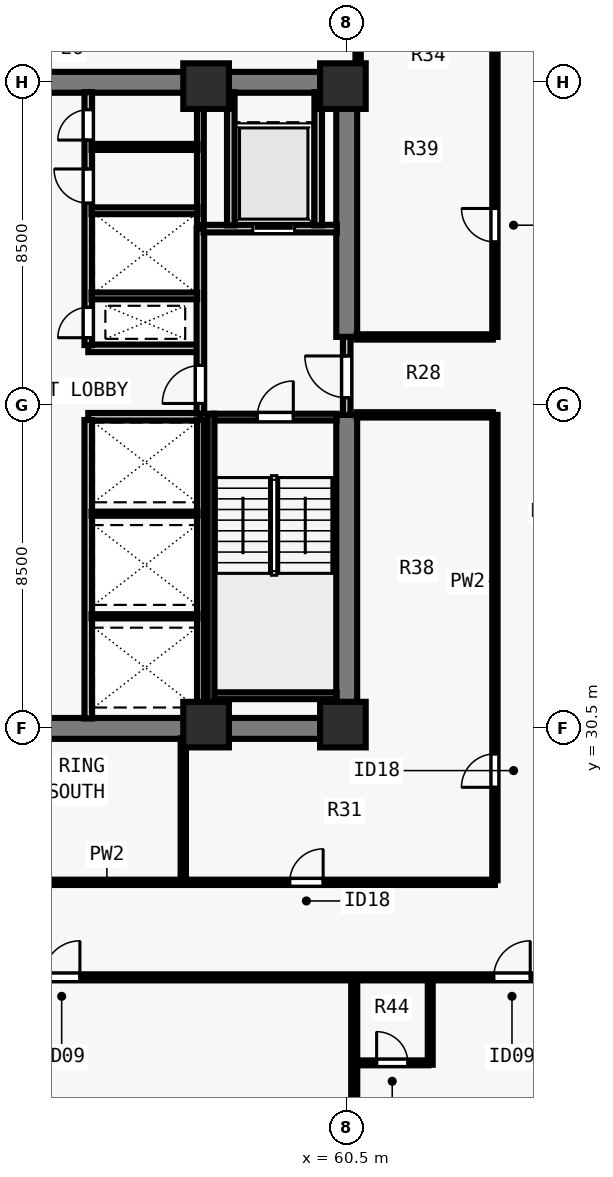
"""IFC4 building model, lengths in metres.
Left out: names, types, materials, properties, quantities, classifications, styles, units other than length and angle.
Written with IfcOpenShell. Run it as: python <this file> out.ifc"""

import sys

from ifc_helpers import new_model, si_unit, direction, frame, frame_2d, origin, origin_2d, place, context, subcontext, project, spatial, rectangle, extrude, element, fill, save


model = new_model("IFC4")
c1 = context("Model", 3, precision=1e-05, world=origin(), true_north=direction((0.0, 1.0)))
c2 = subcontext(c1, "Body", "Model", "MODEL_VIEW")
j1 = project(units=[si_unit("LENGTHUNIT", "METRE"), si_unit("PLANEANGLEUNIT", "RADIAN")], contexts=[c1])
p1 = place(None, origin())
s1 = spatial("IfcSite", under=j1, at=p1, CompositionType="ELEMENT")
p2 = place(p1, origin())
s2 = spatial("IfcBuilding", under=s1, at=p2, CompositionType="ELEMENT")
p3 = place(p2, frame((0.0, 0.0, 86.5)))
s3 = spatial("IfcBuildingStorey", under=s2, at=p3, CompositionType="ELEMENT", Elevation=86.5)
for number, where, z_axis, x_axis in (
    (1, (56.8, 30.6, 0.0), (0.0, 0.0, 1.0), (1.0, 0.0, 0.0)),
    (2, (60.4, 30.6, 0.0), (0.0, 0.0, 1.0), (1.0, 0.0, 0.0)),
    (3, (56.8, 47.4, 0.0), (0.0, 0.0, 1.0), (1.0, 0.0, 0.0)),
    (4, (60.4, 47.4, 0.0), (0.0, 0.0, 1.0), (1.0, 0.0, 0.0)),
):
    element("IfcColumn", number, at=place(p3, frame(where, z_axis=z_axis, x_axis=x_axis)), inside=s3, PredefinedType="COLUMN", context=c2, shape_type="SweptSolid", body=[
        extrude(rectangle(XDim=1.2, YDim=1.2, at=origin_2d()), origin(), (0.0, 0.0, 1.0), 3.5),
    ])
for number, where, z_axis, x_axis in (
    (5, (43.225, 30.5, 0.0), (0.0, 0.0, 1.0), (1.0, 0.0, 0.0)),
    (6, (43.225, 47.5, 0.0), (0.0, 0.0, 1.0), (1.0, 0.0, 0.0)),
):
    element("IfcWall", number, at=place(p3, frame(where, z_axis=z_axis, x_axis=x_axis)), inside=s3, PredefinedType="SHEAR", context=c2, shape_type="SweptSolid", body=[
        extrude(rectangle(XDim=17.55, YDim=0.55, at=frame_2d((8.775, 0.0))), origin(), (0.0, 0.0, 1.0), 3.28),
    ])
p4 = place(p3, frame((60.5, 30.765, 0.0), z_axis=(0.0, 0.0, 1.0), x_axis=(0.0, 1.0, 0.0)))
e7 = element("IfcWall", 7, at=p4, inside=s3, PredefinedType="SHEAR", context=c2, shape_type="SweptSolid", body=[
    extrude(rectangle(XDim=7.985, YDim=0.55, at=frame_2d((3.993, 0.0))), origin(), (0.0, 0.0, 1.0), 3.28),
])
p5 = place(p3, frame((60.5, 40.8, 0.0), z_axis=(0.0, 0.0, 1.0), x_axis=(0.0, 1.0, 0.0)))
e8 = element("IfcWall", 8, at=p5, inside=s3, PredefinedType="SHEAR", context=c2, shape_type="SweptSolid", body=[
    extrude(rectangle(XDim=6.435, YDim=0.55, at=frame_2d((3.218, 0.0))), origin(), (0.0, 0.0, 1.0), 3.28),
])
for number, where, z_axis, x_axis in (
    (9, (53.7, 38.7, 0.0), (0.0, 0.0, 1.0), (1.0, 0.0, 0.0)),
    (10, (53.7, 40.5, 0.0), (0.0, 0.0, 1.0), (1.0, 0.0, 0.0)),
):
    element("IfcWall", number, at=place(p3, frame(where, z_axis=z_axis, x_axis=x_axis)), inside=s3, PredefinedType="SOLIDWALL", context=c2, shape_type="SweptSolid", body=[
        extrude(rectangle(XDim=2.95, YDim=0.2, at=frame_2d((1.475, 0.0))), origin(), (0.0, 0.0, 1.0), 3.28),
    ])
p6 = place(p3, frame((53.7, 30.76, 0.0), z_axis=(0.0, 0.0, 1.0), x_axis=(0.0, 1.0, 0.0)))
e11 = element("IfcWall", 11, at=p6, inside=s3, PredefinedType="SOLIDWALL", context=c2, shape_type="SweptSolid", body=[
    extrude(rectangle(XDim=7.855, YDim=0.2, at=frame_2d((3.927, 0.0))), origin(), (0.0, 0.0, 1.0), 3.28),
])
p7 = place(p3, frame((53.7, 40.585, 0.0), z_axis=(0.0, 0.0, 1.0), x_axis=(0.0, 1.0, 0.0)))
e12 = element("IfcWall", 12, at=p7, inside=s3, PredefinedType="SOLIDWALL", context=c2, shape_type="SweptSolid", body=[
    extrude(rectangle(XDim=6.655, YDim=0.2, at=frame_2d((3.328, 0.0))), origin(), (0.0, 0.0, 1.0), 3.28),
])
p8 = place(p7, frame((0.195, 0.0, 0.0)))
e13 = element("IfcOpeningElement", 13, at=p8, cuts=e12, PredefinedType="OPENING", context=c2, shape_type="SweptSolid", body=[
    extrude(rectangle(XDim=0.8, YDim=2.08, at=frame_2d((0.4, 1.04))), frame((0.0, 0.11, 0.0), z_axis=(0.0, -1.0, 0.0), x_axis=(1.0, 0.0, 0.0)), (0.0, 0.0, 1.0), 0.22),
])
p9 = place(p7, frame((3.735, 0.0, 0.0)))
e14 = element("IfcOpeningElement", 14, at=p9, cuts=e12, PredefinedType="OPENING", context=c2, shape_type="SweptSolid", body=[
    extrude(rectangle(XDim=0.9, YDim=2.12, at=frame_2d((0.45, 1.06))), frame((0.0, 0.11, 0.0), z_axis=(0.0, -1.0, 0.0), x_axis=(1.0, 0.0, 0.0)), (0.0, 0.0, 1.0), 0.22),
])
p10 = place(p7, frame((5.395, 0.0, 0.0)))
e15 = element("IfcOpeningElement", 15, at=p10, cuts=e12, PredefinedType="OPENING", context=c2, shape_type="SweptSolid", body=[
    extrude(rectangle(XDim=0.8, YDim=2.1, at=frame_2d((0.4, 1.05))), frame((0.0, 0.11, 0.0), z_axis=(0.0, -1.0, 0.0), x_axis=(1.0, 0.0, 0.0)), (0.0, 0.0, 1.0), 0.22),
])
p11 = place(p3, frame((60.5, 38.75, 0.0), z_axis=(0.0, 0.0, 1.0), x_axis=(0.0, 1.0, 0.0)))
e16 = element("IfcWall", 16, at=p11, inside=s3, PredefinedType="SOLIDWALL", context=c2, shape_type="SweptSolid", body=[
    extrude(rectangle(XDim=2.05, YDim=0.2, at=frame_2d((1.025, 0.0))), origin(), (0.0, 0.0, 1.0), 3.28),
])
p12 = place(p11, frame((0.45, 0.0, 0.0)))
e17 = element("IfcOpeningElement", 17, at=p12, cuts=e16, PredefinedType="OPENING", context=c2, shape_type="SweptSolid", body=[
    extrude(rectangle(XDim=1.1, YDim=2.15, at=frame_2d((0.55, 1.075))), frame((0.0, 0.11, 0.0), z_axis=(0.0, -1.0, 0.0), x_axis=(1.0, 0.0, 0.0)), (0.0, 0.0, 1.0), 0.22),
])
p13 = place(p3, frame((56.65, 38.785, 0.0), z_axis=(0.0, 0.0, 1.0), x_axis=(0.0, 1.0, 0.0)))
e18 = element("IfcWall", 18, at=p13, inside=s3, PredefinedType="SOLIDWALL", context=c2, shape_type="SweptSolid", body=[
    extrude(rectangle(XDim=4.865, YDim=0.2, at=frame_2d((2.433, 0.0))), origin(), (0.0, 0.0, 1.0), 3.28),
])
p14 = place(p13, frame((0.265, 0.0, 0.0)))
e19 = element("IfcOpeningElement", 19, at=p14, cuts=e18, PredefinedType="OPENING", context=c2, shape_type="SweptSolid", body=[
    extrude(rectangle(XDim=1.0, YDim=2.15, at=frame_2d((0.5, 1.075))), frame((0.0, 0.11, 0.0), z_axis=(0.0, -1.0, 0.0), x_axis=(1.0, 0.0, 0.0)), (0.0, 0.0, 1.0), 0.22),
])
p15 = place(p3, frame((56.735, 43.65, 0.0), z_axis=(0.0, 0.0, 1.0), x_axis=(1.0, 0.0, 0.0)))
e20 = element("IfcWall", 20, at=p15, inside=s3, PredefinedType="SOLIDWALL", context=c2, shape_type="SweptSolid", body=[
    extrude(rectangle(XDim=3.505, YDim=0.2, at=frame_2d((1.752, 0.0))), origin(), (0.0, 0.0, 1.0), 3.28),
])
p16 = place(p15, frame((1.295, 0.0, 0.0)))
e21 = element("IfcOpeningElement", 21, at=p16, cuts=e20, PredefinedType="OPENING", context=c2, shape_type="SweptSolid", body=[
    extrude(rectangle(XDim=1.1, YDim=2.2, at=frame_2d((0.55, 1.1))), frame((0.0, 0.11, 0.0), z_axis=(0.0, -1.0, 0.0), x_axis=(1.0, 0.0, 0.0)), (0.0, 0.0, 1.0), 0.22),
])
for number, where, z_axis, x_axis in (
    (22, (57.45, 43.735, 0.0), (0.0, 0.0, 1.0), (0.0, 1.0, 0.0)),
    (23, (59.75, 43.735, 0.0), (0.0, 0.0, 1.0), (0.0, 1.0, 0.0)),
):
    element("IfcWall", number, at=place(p3, frame(where, z_axis=z_axis, x_axis=x_axis)), inside=s3, PredefinedType="SOLIDWALL", context=c2, shape_type="SweptSolid", body=[
        extrude(rectangle(XDim=3.505, YDim=0.2, at=frame_2d((1.752, 0.0))), origin(), (0.0, 0.0, 1.0), 3.28),
    ])
p17 = place(p3, frame((56.65, 30.76, 0.0), z_axis=(0.0, 0.0, 1.0), x_axis=(0.0, 1.0, 0.0)))
e24 = element("IfcWall", 24, at=p17, inside=s3, PredefinedType="SOLIDWALL", context=c2, shape_type="SweptSolid", body=[
    extrude(rectangle(XDim=7.855, YDim=0.18, at=frame_2d((3.927, 0.0))), origin(), (0.0, 0.0, 1.0), 3.28),
])
for number, where, z_axis, x_axis in (
    (25, (53.785, 33.45, 0.0), (0.0, 0.0, 1.0), (1.0, 0.0, 0.0)),
    (26, (53.785, 36.15, 0.0), (0.0, 0.0, 1.0), (1.0, 0.0, 0.0)),
):
    element("IfcWall", number, at=place(p3, frame(where, z_axis=z_axis, x_axis=x_axis)), inside=s3, PredefinedType="PARTITIONING", context=c2, shape_type="SweptSolid", body=[
        extrude(rectangle(XDim=2.79, YDim=0.11, at=frame_2d((1.395, 0.0))), origin(), (0.0, 0.0, 1.0), 3.28),
    ])
p18 = place(p3, frame((56.65, 43.735, 0.0), z_axis=(0.0, 0.0, 1.0), x_axis=(0.0, 1.0, 0.0)))
e27 = element("IfcWall", 27, at=p18, inside=s3, PredefinedType="SOLIDWALL", context=c2, shape_type="SweptSolid", body=[
    extrude(rectangle(XDim=3.505, YDim=0.18, at=frame_2d((1.752, 0.0))), origin(), (0.0, 0.0, 1.0), 3.28),
])
p19 = place(p3, frame((53.785, 41.88, 0.0), z_axis=(0.0, 0.0, 1.0), x_axis=(1.0, 0.0, 0.0)))
e28 = element("IfcWall", 28, at=p19, inside=s3, PredefinedType="SOLIDWALL", context=c2, shape_type="SweptSolid", body=[
    extrude(rectangle(XDim=2.78, YDim=0.18, at=frame_2d((1.39, 0.0))), origin(), (0.0, 0.0, 1.0), 3.28),
])
p20 = place(p3, frame((53.785, 44.12, 0.0), z_axis=(0.0, 0.0, 1.0), x_axis=(1.0, 0.0, 0.0)))
e29 = element("IfcWall", 29, at=p20, inside=s3, PredefinedType="SOLIDWALL", context=c2, shape_type="SweptSolid", body=[
    extrude(rectangle(XDim=2.79, YDim=0.18, at=frame_2d((1.395, 0.0))), origin(), (0.0, 0.0, 1.0), 3.28),
])
p21 = place(p3, frame((53.785, 45.8, 0.0), z_axis=(0.0, 0.0, 1.0), x_axis=(1.0, 0.0, 0.0)))
e30 = element("IfcWall", 30, at=p21, inside=s3, PredefinedType="PARTITIONING", context=c2, shape_type="SweptSolid", body=[
    extrude(rectangle(XDim=2.79, YDim=0.16, at=frame_2d((1.395, 0.0))), origin(), (0.0, 0.0, 1.0), 3.28),
])
p22 = place(p3, frame((37.1, 23.95, 0.0), z_axis=(0.0, 0.0, 1.0), x_axis=(1.0, 0.0, 0.0)))
e31 = element("IfcWall", 31, at=p22, inside=s3, PredefinedType="PARTITIONING", context=c2, shape_type="SweptSolid", body=[
    extrude(rectangle(XDim=29.8, YDim=0.16, at=frame_2d((14.9, 0.0))), origin(), (0.0, 0.0, 1.0), 3.28),
])
p23 = place(p22, frame((2.571, 0.0, 0.0)))
e32 = element("IfcOpeningElement", 32, at=p23, cuts=e31, PredefinedType="OPENING", context=c2, shape_type="SweptSolid", body=[
    extrude(rectangle(XDim=0.96, YDim=2.15, at=frame_2d((0.48, 1.075))), frame((0.0, 0.09, 0.0), z_axis=(0.0, -1.0, 0.0), x_axis=(1.0, 0.0, 0.0)), (0.0, 0.0, 1.0), 0.18),
])
p24 = place(p22, frame((15.42, 0.0, 0.0)))
e33 = element("IfcOpeningElement", 33, at=p24, cuts=e31, PredefinedType="OPENING", context=c2, shape_type="SweptSolid", body=[
    extrude(rectangle(XDim=0.96, YDim=2.15, at=frame_2d((0.48, 1.075))), frame((0.0, 0.09, 0.0), z_axis=(0.0, -1.0, 0.0), x_axis=(1.0, 0.0, 0.0)), (0.0, 0.0, 1.0), 0.18),
])
p25 = place(p22, frame((27.269, 0.0, 0.0)))
e34 = element("IfcOpeningElement", 34, at=p25, cuts=e31, PredefinedType="OPENING", context=c2, shape_type="SweptSolid", body=[
    extrude(rectangle(XDim=0.96, YDim=2.15, at=frame_2d((0.48, 1.075))), frame((0.0, 0.09, 0.0), z_axis=(0.0, -1.0, 0.0), x_axis=(1.0, 0.0, 0.0)), (0.0, 0.0, 1.0), 0.18),
])
p26 = place(p3, frame((39.6, 26.45, 0.0), z_axis=(0.0, 0.0, 1.0), x_axis=(1.0, 0.0, 0.0)))
e35 = element("IfcWall", 35, at=p26, inside=s3, PredefinedType="PARTITIONING", context=c2, shape_type="SweptSolid", body=[
    extrude(rectangle(XDim=24.8, YDim=0.14, at=frame_2d((12.4, 0.0))), origin(), (0.0, 0.0, 1.0), 3.28),
])
p27 = place(p26, frame((1.2, 0.0, 0.0)))
e36 = element("IfcOpeningElement", 36, at=p27, cuts=e35, PredefinedType="OPENING", context=c2, shape_type="SweptSolid", body=[
    extrude(rectangle(XDim=0.88, YDim=2.1, at=frame_2d((0.44, 1.05))), frame((0.0, 0.08, 0.0), z_axis=(0.0, -1.0, 0.0), x_axis=(1.0, 0.0, 0.0)), (0.0, 0.0, 1.0), 0.16),
])
p28 = place(p26, frame((8.9, 0.0, 0.0)))
e37 = element("IfcOpeningElement", 37, at=p28, cuts=e35, PredefinedType="OPENING", context=c2, shape_type="SweptSolid", body=[
    extrude(rectangle(XDim=0.88, YDim=2.1, at=frame_2d((0.44, 1.05))), frame((0.0, 0.08, 0.0), z_axis=(0.0, -1.0, 0.0), x_axis=(1.0, 0.0, 0.0)), (0.0, 0.0, 1.0), 0.16),
])
p29 = place(p26, frame((19.4, 0.0, 0.0)))
e38 = element("IfcOpeningElement", 38, at=p29, cuts=e35, PredefinedType="OPENING", context=c2, shape_type="SweptSolid", body=[
    extrude(rectangle(XDim=0.88, YDim=2.1, at=frame_2d((0.44, 1.05))), frame((0.0, 0.08, 0.0), z_axis=(0.0, -1.0, 0.0), x_axis=(1.0, 0.0, 0.0)), (0.0, 0.0, 1.0), 0.16),
])
p30 = place(p3, frame((64.4, 26.505, 0.0), z_axis=(0.0, 0.0, 1.0), x_axis=(0.0, 1.0, 0.0)))
e39 = element("IfcWall", 39, at=p30, inside=s3, PredefinedType="PARTITIONING", context=c2, shape_type="SweptSolid", body=[
    extrude(rectangle(XDim=12.245, YDim=0.14, at=frame_2d((6.123, 0.0))), origin(), (0.0, 0.0, 1.0), 3.28),
])
p31 = place(p30, frame((2.445, 0.0, 0.0)))
e40 = element("IfcOpeningElement", 40, at=p31, cuts=e39, PredefinedType="OPENING", context=c2, shape_type="SweptSolid", body=[
    extrude(rectangle(XDim=0.88, YDim=2.1, at=frame_2d((0.44, 1.05))), frame((0.0, 0.08, 0.0), z_axis=(0.0, -1.0, 0.0), x_axis=(1.0, 0.0, 0.0)), (0.0, 0.0, 1.0), 0.16),
])
p32 = place(p3, frame((64.4, 40.8, 0.0), z_axis=(0.0, 0.0, 1.0), x_axis=(0.0, 1.0, 0.0)))
e41 = element("IfcWall", 41, at=p32, inside=s3, PredefinedType="PARTITIONING", context=c2, shape_type="SweptSolid", body=[
    extrude(rectangle(XDim=10.695, YDim=0.14, at=frame_2d((5.348, 0.0))), origin(), (0.0, 0.0, 1.0), 3.28),
])
p33 = place(p32, frame((2.5, 0.0, 0.0)))
e42 = element("IfcOpeningElement", 42, at=p33, cuts=e41, PredefinedType="OPENING", context=c2, shape_type="SweptSolid", body=[
    extrude(rectangle(XDim=0.88, YDim=2.1, at=frame_2d((0.44, 1.05))), frame((0.0, 0.08, 0.0), z_axis=(0.0, -1.0, 0.0), x_axis=(1.0, 0.0, 0.0)), (0.0, 0.0, 1.0), 0.16),
])
for number, where, z_axis, x_axis in (
    (43, (60.76, 38.75, 0.0), (0.0, 0.0, 1.0), (1.0, 0.0, 0.0)),
    (44, (60.76, 40.8, 0.0), (0.0, 0.0, 1.0), (1.0, 0.0, 0.0)),
):
    element("IfcWall", number, at=place(p3, frame(where, z_axis=z_axis, x_axis=x_axis)), inside=s3, PredefinedType="PARTITIONING", context=c2, shape_type="SweptSolid", body=[
        extrude(rectangle(XDim=3.585, YDim=0.14, at=frame_2d((1.792, 0.0))), origin(), (0.0, 0.0, 1.0), 3.28),
    ])
p34 = place(p3, frame((56.2, 26.505, 0.0), z_axis=(0.0, 0.0, 1.0), x_axis=(0.0, 1.0, 0.0)))
e45 = element("IfcWall", 45, at=p34, inside=s3, PredefinedType="PARTITIONING", context=c2, shape_type="SweptSolid", body=[
    extrude(rectangle(XDim=3.735, YDim=0.14, at=frame_2d((1.868, 0.0))), origin(), (0.0, 0.0, 1.0), 2.849),
])
p35 = place(p3, frame((60.8, 47.76, 0.0), z_axis=(0.0, 0.0, 1.0), x_axis=(0.0, 1.0, 0.0)))
e46 = element("IfcWall", 46, at=p35, inside=s3, PredefinedType="PARTITIONING", context=c2, shape_type="SweptSolid", body=[
    extrude(rectangle(XDim=3.735, YDim=0.14, at=frame_2d((1.868, 0.0))), origin(), (0.0, 0.0, 1.0), 2.439),
])
p36 = place(p3, frame((60.698, 13.845, 0.0), z_axis=(0.0, 0.0, 1.0), x_axis=(0.0, 1.0, 0.0)))
e47 = element("IfcWall", 47, at=p36, inside=s3, PredefinedType="PARTITIONING", context=c2, shape_type="SweptSolid", body=[
    extrude(rectangle(XDim=10.04, YDim=0.16, at=frame_2d((5.02, 0.0))), origin(), (0.0, 0.0, 1.0), 3.28),
])
p37 = place(p3, frame((62.698, 21.65, 0.0), z_axis=(0.0, 0.0, 1.0), x_axis=(0.0, 1.0, 0.0)))
e48 = element("IfcWall", 48, at=p37, inside=s3, PredefinedType="PLUMBINGWALL", context=c2, shape_type="SweptSolid", body=[
    extrude(rectangle(XDim=2.235, YDim=0.13, at=frame_2d((1.118, 0.0))), origin(), (0.0, 0.0, 1.0), 3.28),
])
p38 = place(p3, frame((60.762, 21.7, 0.0), z_axis=(0.0, 0.0, 1.0), x_axis=(1.0, 0.0, 0.0)))
e49 = element("IfcWall", 49, at=p38, inside=s3, PredefinedType="PLUMBINGWALL", context=c2, shape_type="SweptSolid", body=[
    extrude(rectangle(XDim=1.885, YDim=0.13, at=frame_2d((0.942, 0.0))), origin(), (0.0, 0.0, 1.0), 3.28),
])
p39 = place(p38, frame((0.525, 0.0, 0.0)))
e50 = element("IfcOpeningElement", 50, at=p39, cuts=e49, PredefinedType="OPENING", context=c2, shape_type="SweptSolid", body=[
    extrude(rectangle(XDim=0.82, YDim=2.1, at=frame_2d((0.41, 1.05))), frame((0.0, 0.075, 0.0), z_axis=(0.0, -1.0, 0.0), x_axis=(1.0, 0.0, 0.0)), (0.0, 0.0, 1.0), 0.15),
])
p40 = place(p3, frame((57.005, 38.69, 0.0), z_axis=(0.0, 0.0, 1.0), x_axis=(1.0, 0.0, 0.0)))
e51 = element("IfcWall", 51, at=p40, inside=s3, PredefinedType="SOLIDWALL", context=c2, shape_type="SweptSolid", body=[
    extrude(rectangle(XDim=3.23, YDim=0.18, at=frame_2d((1.615, 0.0))), origin(), (0.0, 0.0, 1.0), 3.28),
])
p41 = place(p40, frame((1.14, 0.0, 0.0)))
e52 = element("IfcOpeningElement", 52, at=p41, cuts=e51, PredefinedType="OPENING", context=c2, shape_type="SweptSolid", body=[
    extrude(rectangle(XDim=0.95, YDim=2.15, at=frame_2d((0.475, 1.075))), frame((0.0, 0.1, 0.0), z_axis=(0.0, -1.0, 0.0), x_axis=(1.0, 0.0, 0.0)), (0.0, 0.0, 1.0), 0.2),
])
p42 = place(p3, frame((57.005, 31.36, 0.0), z_axis=(0.0, 0.0, 1.0), x_axis=(1.0, 0.0, 0.0)))
e53 = element("IfcWall", 53, at=p42, inside=s3, PredefinedType="SOLIDWALL", context=c2, shape_type="SweptSolid", body=[
    extrude(rectangle(XDim=3.23, YDim=0.18, at=frame_2d((1.615, 0.0))), origin(), (0.0, 0.0, 1.0), 3.28),
])
p43 = place(p3, frame((56.93, 38.78, 0.0), z_axis=(0.0, 0.0, 1.0), x_axis=(0.0, -1.0, 0.0)))
e54 = element("IfcWall", 54, at=p43, inside=s3, PredefinedType="SOLIDWALL", context=c2, shape_type="SweptSolid", body=[
    extrude(rectangle(XDim=8.017, YDim=0.18, at=frame_2d((4.009, 0.0))), origin(), (0.0, 0.0, 1.0), 3.28),
])
p44 = place(p12, origin())
e55 = element("IfcDoor", 55, at=p44, inside=s3, OperationType="SINGLE_SWING_RIGHT", PredefinedType="DOOR", context=c2, shape_type="SweptSolid", body=[
    extrude(rectangle(XDim=1.1, YDim=2.15, at=frame_2d((0.55, 1.075))), frame((0.0, 0.025, 0.0), z_axis=(0.0, -1.0, 0.0), x_axis=(1.0, 0.0, 0.0)), (0.0, 0.0, 1.0), 0.05),
])
fill(e17, e55)
p45 = place(p14, origin())
e56 = element("IfcDoor", 56, at=p45, inside=s3, OperationType="SINGLE_SWING_LEFT", PredefinedType="DOOR", context=c2, shape_type="SweptSolid", body=[
    extrude(rectangle(XDim=1.0, YDim=2.15, at=frame_2d((0.5, 1.075))), frame((0.0, 0.025, 0.0), z_axis=(0.0, -1.0, 0.0), x_axis=(1.0, 0.0, 0.0)), (0.0, 0.0, 1.0), 0.05),
])
fill(e19, e56)
p46 = place(p16, origin())
e57 = element("IfcDoor", 57, at=p46, inside=s3, OperationType="SLIDING_TO_LEFT", PredefinedType="DOOR", context=c2, shape_type="SweptSolid", body=[
    extrude(rectangle(XDim=1.1, YDim=2.2, at=frame_2d((0.55, 1.1))), frame((0.0, 0.025, 0.0), z_axis=(0.0, -1.0, 0.0), x_axis=(1.0, 0.0, 0.0)), (0.0, 0.0, 1.0), 0.05),
])
fill(e21, e57)
p47 = place(p8, origin())
e58 = element("IfcDoor", 58, at=p47, inside=s3, OperationType="SINGLE_SWING_LEFT", PredefinedType="DOOR", context=c2, shape_type="SweptSolid", body=[
    extrude(rectangle(XDim=0.8, YDim=2.08, at=frame_2d((0.4, 1.04))), frame((0.0, 0.025, 0.0), z_axis=(0.0, -1.0, 0.0), x_axis=(1.0, 0.0, 0.0)), (0.0, 0.0, 1.0), 0.05),
])
fill(e13, e58)
p48 = place(p9, origin())
e59 = element("IfcDoor", 59, at=p48, inside=s3, OperationType="SINGLE_SWING_RIGHT", PredefinedType="DOOR", context=c2, shape_type="SweptSolid", body=[
    extrude(rectangle(XDim=0.9, YDim=2.12, at=frame_2d((0.45, 1.06))), frame((0.0, 0.025, 0.0), z_axis=(0.0, -1.0, 0.0), x_axis=(1.0, 0.0, 0.0)), (0.0, 0.0, 1.0), 0.05),
])
fill(e14, e59)
p49 = place(p10, origin())
e60 = element("IfcDoor", 60, at=p49, inside=s3, OperationType="SINGLE_SWING_LEFT", PredefinedType="DOOR", context=c2, shape_type="SweptSolid", body=[
    extrude(rectangle(XDim=0.8, YDim=2.1, at=frame_2d((0.4, 1.05))), frame((0.0, 0.025, 0.0), z_axis=(0.0, -1.0, 0.0), x_axis=(1.0, 0.0, 0.0)), (0.0, 0.0, 1.0), 0.05),
])
fill(e15, e60)
p50 = place(p29, origin())
e61 = element("IfcDoor", 61, at=p50, inside=s3, OperationType="SINGLE_SWING_RIGHT", PredefinedType="DOOR", context=c2, shape_type="SweptSolid", body=[
    extrude(rectangle(XDim=0.88, YDim=2.1, at=frame_2d((0.44, 1.05))), frame((0.0, 0.025, 0.0), z_axis=(0.0, -1.0, 0.0), x_axis=(1.0, 0.0, 0.0)), (0.0, 0.0, 1.0), 0.05),
])
fill(e38, e61)
p51 = place(p31, origin())
e62 = element("IfcDoor", 62, at=p51, inside=s3, OperationType="SINGLE_SWING_LEFT", PredefinedType="DOOR", context=c2, shape_type="SweptSolid", body=[
    extrude(rectangle(XDim=0.88, YDim=2.1, at=frame_2d((0.44, 1.05))), frame((0.0, 0.025, 0.0), z_axis=(0.0, -1.0, 0.0), x_axis=(1.0, 0.0, 0.0)), (0.0, 0.0, 1.0), 0.05),
])
fill(e40, e62)
p52 = place(p33, origin())
e63 = element("IfcDoor", 63, at=p52, inside=s3, OperationType="SINGLE_SWING_RIGHT", PredefinedType="DOOR", context=c2, shape_type="SweptSolid", body=[
    extrude(rectangle(XDim=0.88, YDim=2.1, at=frame_2d((0.44, 1.05))), frame((0.0, 0.025, 0.0), z_axis=(0.0, -1.0, 0.0), x_axis=(1.0, 0.0, 0.0)), (0.0, 0.0, 1.0), 0.05),
])
fill(e42, e63)
p53 = place(p24, origin())
e64 = element("IfcDoor", 64, at=p53, inside=s3, OperationType="SINGLE_SWING_RIGHT", PredefinedType="DOOR", context=c2, shape_type="SweptSolid", body=[
    extrude(rectangle(XDim=0.96, YDim=2.15, at=frame_2d((0.48, 1.075))), frame((0.0, 0.025, 0.0), z_axis=(0.0, -1.0, 0.0), x_axis=(1.0, 0.0, 0.0)), (0.0, 0.0, 1.0), 0.05),
])
fill(e33, e64)
p54 = place(p39, origin())
e65 = element("IfcDoor", 65, at=p54, inside=s3, OperationType="SINGLE_SWING_LEFT", PredefinedType="DOOR", context=c2, shape_type="SweptSolid", body=[
    extrude(rectangle(XDim=0.82, YDim=2.1, at=frame_2d((0.41, 1.05))), frame((0.0, 0.025, 0.0), z_axis=(0.0, -1.0, 0.0), x_axis=(1.0, 0.0, 0.0)), (0.0, 0.0, 1.0), 0.05),
])
fill(e50, e65)
p55 = place(p25, origin())
e66 = element("IfcDoor", 66, at=p55, inside=s3, OperationType="SINGLE_SWING_RIGHT", PredefinedType="DOOR", context=c2, shape_type="SweptSolid", body=[
    extrude(rectangle(XDim=0.96, YDim=2.15, at=frame_2d((0.48, 1.075))), frame((0.0, 0.025, 0.0), z_axis=(0.0, -1.0, 0.0), x_axis=(1.0, 0.0, 0.0)), (0.0, 0.0, 1.0), 0.05),
])
fill(e34, e66)
p56 = place(p41, origin())
e67 = element("IfcDoor", 67, at=p56, inside=s3, OperationType="SINGLE_SWING_RIGHT", PredefinedType="DOOR", context=c2, shape_type="SweptSolid", body=[
    extrude(rectangle(XDim=0.95, YDim=2.15, at=frame_2d((0.475, 1.075))), frame((0.0, 0.025, 0.0), z_axis=(0.0, -1.0, 0.0), x_axis=(1.0, 0.0, 0.0)), (0.0, 0.0, 1.0), 0.05),
])
fill(e52, e67)
save(model, sys.argv[1])
